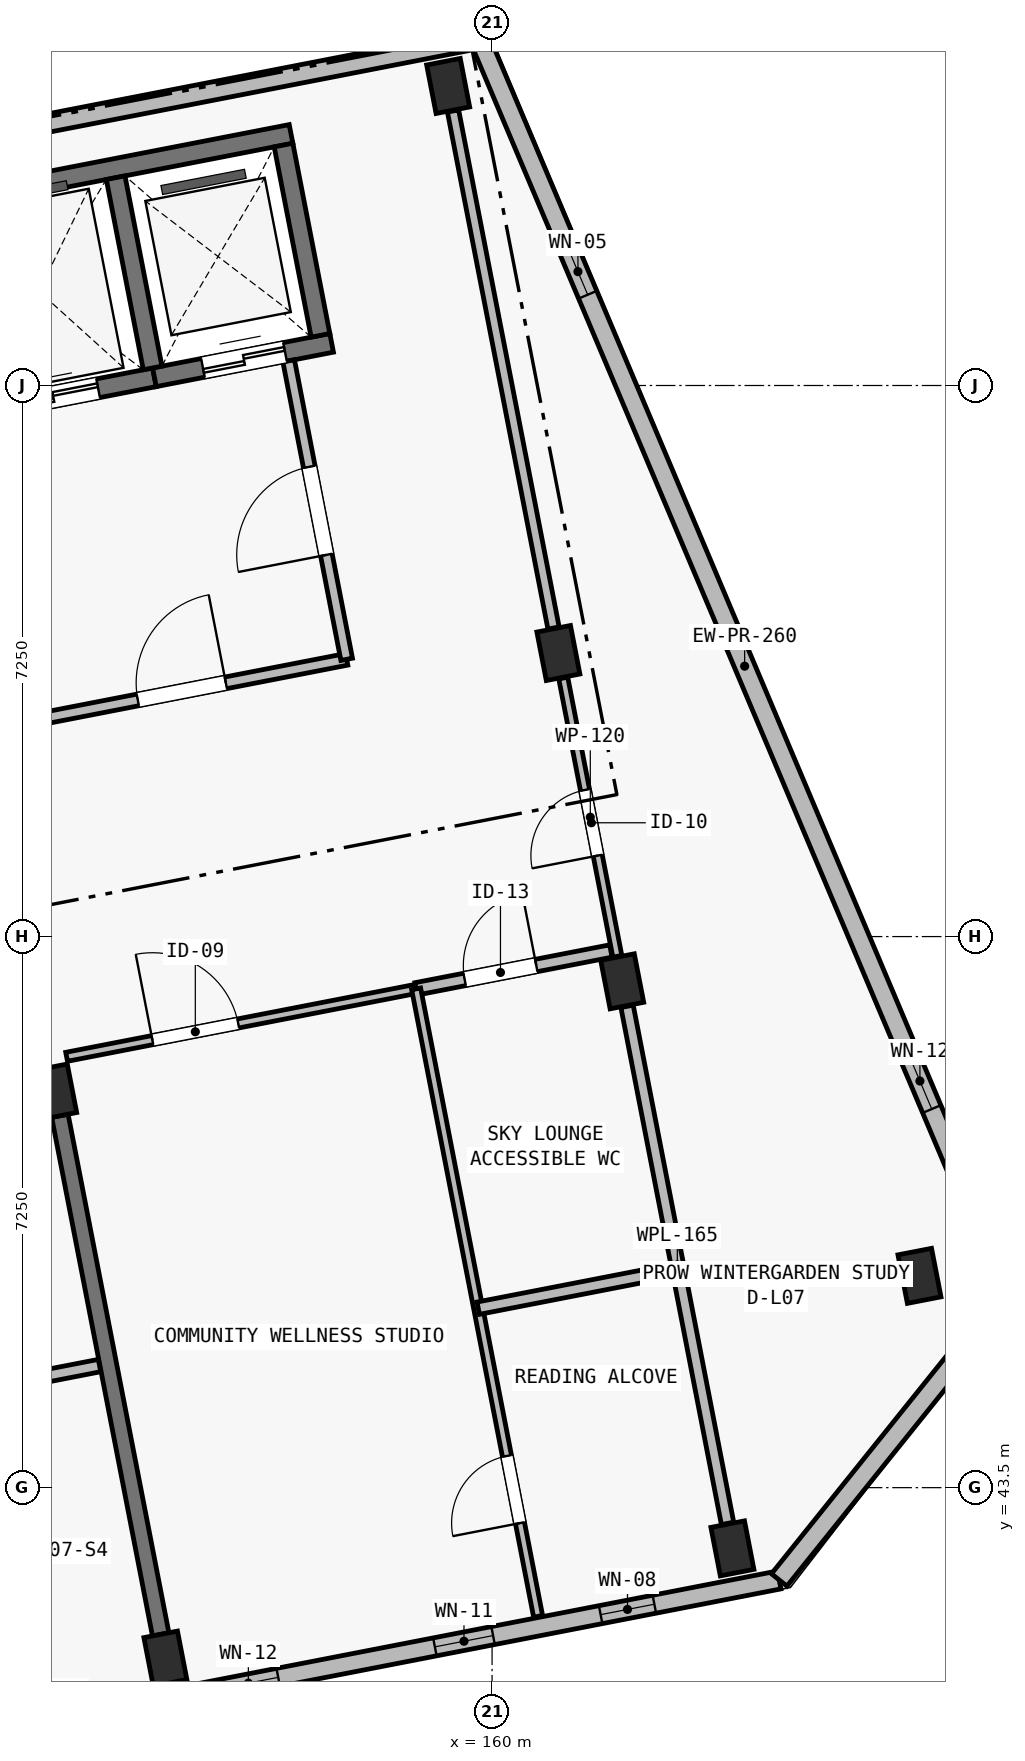
"""IFC4 building model, lengths in metres.
Left out: names, types, materials, properties, quantities, classifications, styles, units other than length and angle.
Written with IfcOpenShell. Run it as: python <this file> out.ifc"""

import sys

from ifc_helpers import new_model, si_unit, direction, frame, frame_2d, origin, origin_2d, place, context, subcontext, project, spatial, rectangle, extrude, element, fill, save


model = new_model("IFC4")
c1 = context("Model", 3, precision=1e-05, world=origin(), true_north=direction((0.0, 1.0)))
c2 = subcontext(c1, "Body", "Model", "MODEL_VIEW")
j1 = project(units=[si_unit("LENGTHUNIT", "METRE"), si_unit("PLANEANGLEUNIT", "RADIAN")], contexts=[c1])
p1 = place(None, origin())
s1 = spatial("IfcSite", under=j1, at=p1, CompositionType="ELEMENT")
p2 = place(p1, origin())
s2 = spatial("IfcBuilding", under=s1, at=p2, CompositionType="ELEMENT")
p3 = place(p2, frame((0.0, 0.0, 24.65)))
s3 = spatial("IfcBuildingStorey", under=s2, at=p3, CompositionType="ELEMENT", Elevation=24.65)
for number, where, z_axis, x_axis in (
    (1, (155.702, 41.251, 0.0), (0.0, 0.0, 1.0), (0.982, 0.191, 0.0)),
    (2, (154.252, 48.711, 0.0), (0.0, 0.0, 1.0), (0.982, 0.191, 0.0)),
    (3, (163.162, 42.701, 0.0), (0.0, 0.0, 1.0), (0.982, 0.191, 0.0)),
    (4, (161.712, 50.161, 0.0), (0.0, 0.0, 1.0), (0.982, 0.191, 0.0)),
    (5, (160.873, 54.48, 0.0), (0.0, 0.0, 1.0), (0.982, 0.191, 0.0)),
    (6, (159.422, 61.941, 0.0), (0.0, 0.0, 1.0), (0.982, 0.191, 0.0)),
    (7, (165.623, 46.286, 0.0), (0.0, 0.0, 1.0), (0.982, 0.191, 0.0)),
):
    element("IfcColumn", number, at=place(p3, frame(where, z_axis=z_axis, x_axis=x_axis)), inside=s3, PredefinedType="COLUMN", context=c2, shape_type="SweptSolid", body=[
        extrude(rectangle(XDim=0.45, YDim=0.65, at=origin_2d()), origin(), (0.0, 0.0, 1.0), 3.25),
    ])
p4 = place(p3, frame((155.64, 41.57, 0.0), z_axis=(0.0, 0.0, 1.0), x_axis=(-0.190817005532, 0.981625626397, 0.0)))
e8 = element("IfcWall", 8, at=p4, inside=s3, PredefinedType="SHEAR", context=c2, shape_type="SweptSolid", body=[
    extrude(rectangle(XDim=6.95, YDim=0.22, at=frame_2d((3.475, 0.0))), origin(), (0.0, 0.0, 1.0), 2.5),
])
p5 = place(p3, frame((152.397, 60.346, 0.0), z_axis=(0.0, 0.0, 1.0), x_axis=(0.981635261308, 0.190767433692, 0.0)))
e9 = element("IfcWall", 9, at=p5, inside=s3, PredefinedType="SHEAR", context=c2, shape_type="SweptSolid", body=[
    extrude(rectangle(XDim=5.05, YDim=0.25, at=frame_2d((2.525, 0.0))), origin(), (0.0, 0.0, 1.0), 3.25),
])
p6 = place(p3, frame((152.932, 57.598, 0.0), z_axis=(0.0, 0.0, 1.0), x_axis=(0.981636759622, 0.190759723627, 0.0)))
e10 = element("IfcWall", 10, at=p6, inside=s3, PredefinedType="SHEAR", context=c2, shape_type="SweptSolid", body=[
    extrude(rectangle(XDim=2.675, YDim=0.25, at=frame_2d((1.337, 0.0))), origin(), (0.0, 0.0, 1.0), 3.25),
])
p7 = place(p6, frame((0.72, 0.0, 0.0)))
e11 = element("IfcOpeningElement", 11, at=p7, cuts=e10, PredefinedType="OPENING", context=c2, shape_type="SweptSolid", body=[
    extrude(rectangle(XDim=1.2, YDim=2.2, at=frame_2d((0.6, 1.1))), frame((0.0, 0.14, 0.0), z_axis=(0.0, -1.0, 0.0), x_axis=(1.0, 0.0, 0.0)), (0.0, 0.0, 1.0), 0.28),
])
p8 = place(p3, frame((155.558, 58.108, 0.0), z_axis=(0.0, 0.0, 1.0), x_axis=(0.981633573872, 0.190776116556, 0.0)))
e12 = element("IfcWall", 12, at=p8, inside=s3, PredefinedType="SHEAR", context=c2, shape_type="SweptSolid", body=[
    extrude(rectangle(XDim=2.375, YDim=0.25, at=frame_2d((1.188, 0.0))), origin(), (0.0, 0.0, 1.0), 3.25),
])
p9 = place(p8, frame((0.65, 0.0, 0.0)))
e13 = element("IfcOpeningElement", 13, at=p9, cuts=e12, PredefinedType="OPENING", context=c2, shape_type="SweptSolid", body=[
    extrude(rectangle(XDim=1.1, YDim=2.15, at=frame_2d((0.55, 1.075))), frame((0.0, 0.14, 0.0), z_axis=(0.0, -1.0, 0.0), x_axis=(1.0, 0.0, 0.0)), (0.0, 0.0, 1.0), 0.28),
])
for number, where, z_axis, x_axis in (
    (14, (155.534, 58.231, 0.0), (0.0, 0.0, 1.0), (-0.191, 0.982, 0.0)),
    (15, (157.742, 58.66, 0.0), (0.0, 0.0, 1.0), (-0.191, 0.982, 0.0)),
):
    element("IfcWall", number, at=place(p3, frame(where, z_axis=z_axis, x_axis=x_axis)), inside=s3, PredefinedType="SHEAR", context=c2, shape_type="SweptSolid", body=[
        extrude(rectangle(XDim=2.55, YDim=0.25, at=frame_2d((1.275, 0.0))), origin(), (0.0, 0.0, 1.0), 3.25),
    ])
p10 = place(p3, frame((163.778, 42.286, 0.0), z_axis=(0.0, 0.0, 1.0), x_axis=(-0.981628367112, -0.190802905848, 0.0)))
e16 = element("IfcWall", 16, at=p10, inside=s3, PredefinedType="SOLIDWALL", context=c2, shape_type="SweptSolid", body=[
    extrude(rectangle(XDim=8.125, YDim=0.24, at=frame_2d((4.062, 0.0))), origin(), (0.0, 0.0, 1.0), 3.0),
])
p11 = place(p10, frame((1.673, 0.0, 0.42)))
e17 = element("IfcOpeningElement", 17, at=p11, cuts=e16, PredefinedType="OPENING", context=c2, shape_type="SweptSolid", body=[
    extrude(rectangle(XDim=0.72, YDim=2.16, at=frame_2d((0.36, 1.08))), frame((0.0, 0.135, 0.0), z_axis=(0.0, -1.0, 0.0), x_axis=(1.0, 0.0, 0.0)), (0.0, 0.0, 1.0), 0.27),
])
p12 = place(p10, frame((3.835, 0.0, 0.42)))
e18 = element("IfcOpeningElement", 18, at=p12, cuts=e16, PredefinedType="OPENING", context=c2, shape_type="SweptSolid", body=[
    extrude(rectangle(XDim=0.78, YDim=2.2, at=frame_2d((0.39, 1.1))), frame((0.0, 0.135, 0.0), z_axis=(0.0, -1.0, 0.0), x_axis=(1.0, 0.0, 0.0)), (0.0, 0.0, 1.0), 0.27),
])
p13 = place(p10, frame((6.715, 0.0, 0.48)))
e19 = element("IfcOpeningElement", 19, at=p13, cuts=e16, PredefinedType="OPENING", context=c2, shape_type="SweptSolid", body=[
    extrude(rectangle(XDim=0.8, YDim=2.3, at=frame_2d((0.4, 1.15))), frame((0.0, 0.135, 0.0), z_axis=(0.0, -1.0, 0.0), x_axis=(1.0, 0.0, 0.0)), (0.0, 0.0, 1.0), 0.27),
])
p14 = place(p3, frame((151.862, 61.006, 0.0), z_axis=(0.0, 0.0, 1.0), x_axis=(0.981627273155, 0.190808533872, 0.0)))
e20 = element("IfcWall", 20, at=p14, inside=s3, PredefinedType="SOLIDWALL", context=c2, shape_type="SweptSolid", body=[
    extrude(rectangle(XDim=8.125, YDim=0.24, at=frame_2d((4.062, 0.0))), origin(), (0.0, 0.0, 1.0), 3.0),
])
p15 = place(p3, frame((159.837, 62.556, 0.0), z_axis=(0.0, 0.0, 1.0), x_axis=(0.389225507936, -0.921142499276, 0.0)))
e21 = element("IfcWall", 21, at=p15, inside=s3, PredefinedType="SOLIDWALL", context=c2, shape_type="SweptSolid", body=[
    extrude(rectangle(XDim=17.91, YDim=0.26, at=frame_2d((8.955, 0.0))), origin(), (0.0, 0.0, 1.0), 3.0),
])
p16 = place(p15, frame((2.99, 0.0, 0.52)))
e22 = element("IfcOpeningElement", 22, at=p16, cuts=e21, PredefinedType="OPENING", context=c2, shape_type="SweptSolid", body=[
    extrude(rectangle(XDim=0.66, YDim=2.32, at=frame_2d((0.33, 1.16))), frame((0.0, 0.145, 0.0), z_axis=(0.0, -1.0, 0.0), x_axis=(1.0, 0.0, 0.0)), (0.0, 0.0, 1.0), 0.29),
])
p17 = place(p15, frame((14.48, 0.0, 0.45)))
e23 = element("IfcOpeningElement", 23, at=p17, cuts=e21, PredefinedType="OPENING", context=c2, shape_type="SweptSolid", body=[
    extrude(rectangle(XDim=0.8, YDim=2.3, at=frame_2d((0.4, 1.15))), frame((0.0, 0.145, 0.0), z_axis=(0.0, -1.0, 0.0), x_axis=(1.0, 0.0, 0.0)), (0.0, 0.0, 1.0), 0.29),
])
p18 = place(p3, frame((166.809, 46.058, 0.0), z_axis=(0.0, 0.0, 1.0), x_axis=(-0.626281072923, -0.779597343312, 0.0)))
e24 = element("IfcWall", 24, at=p18, inside=s3, PredefinedType="SOLIDWALL", context=c2, shape_type="SweptSolid", body=[
    extrude(rectangle(XDim=4.839, YDim=0.26, at=frame_2d((2.42, 0.0))), origin(), (0.0, 0.0, 1.0), 3.0),
])
p19 = place(p3, frame((153.768, 53.558, 0.0), z_axis=(0.0, 0.0, 1.0), x_axis=(0.981624918225, 0.190820648566, 0.0)))
e25 = element("IfcWall", 25, at=p19, inside=s3, PredefinedType="PARTITIONING", context=c2, shape_type="SweptSolid", body=[
    extrude(rectangle(XDim=4.4, YDim=0.155, at=frame_2d((2.2, 0.0))), origin(), (0.0, 0.0, 1.0), 2.97),
])
p20 = place(p19, frame((1.6, 0.0, 0.0)))
e26 = element("IfcOpeningElement", 26, at=p20, cuts=e25, PredefinedType="OPENING", context=c2, shape_type="SweptSolid", body=[
    extrude(rectangle(XDim=1.18, YDim=2.15, at=frame_2d((0.59, 1.075))), frame((0.0, 0.093, 0.0), z_axis=(0.0, -1.0, 0.0), x_axis=(1.0, 0.0, 0.0)), (0.0, 0.0, 1.0), 0.185),
])
p21 = place(p3, frame((158.087, 54.397, 0.0), z_axis=(0.0, 0.0, 1.0), x_axis=(-0.190796144009, 0.981629681413, 0.0)))
e27 = element("IfcWall", 27, at=p21, inside=s3, PredefinedType="PARTITIONING", context=c2, shape_type="SweptSolid", body=[
    extrude(rectangle(XDim=4.0, YDim=0.155, at=frame_2d((2.0, 0.0))), origin(), (0.0, 0.0, 1.0), 2.97),
])
p22 = place(p21, frame((1.4, 0.0, 0.0)))
e28 = element("IfcOpeningElement", 28, at=p22, cuts=e27, PredefinedType="OPENING", context=c2, shape_type="SweptSolid", body=[
    extrude(rectangle(XDim=1.18, YDim=2.15, at=frame_2d((0.59, 1.075))), frame((0.0, 0.093, 0.0), z_axis=(0.0, -1.0, 0.0), x_axis=(1.0, 0.0, 0.0)), (0.0, 0.0, 1.0), 0.185),
])
p23 = place(p3, frame((161.648, 50.49, 0.0), z_axis=(0.0, 0.0, 1.0), x_axis=(-0.190789073686, 0.981631055622, 0.0)))
e29 = element("IfcWall", 29, at=p23, inside=s3, PredefinedType="PARTITIONING", context=c2, shape_type="SweptSolid", body=[
    extrude(rectangle(XDim=3.73, YDim=0.12, at=frame_2d((1.865, 0.0))), origin(), (0.0, 0.0, 1.0), 2.5),
])
p24 = place(p23, frame((1.35, 0.0, 0.0)))
e30 = element("IfcOpeningElement", 30, at=p24, cuts=e29, PredefinedType="OPENING", context=c2, shape_type="SweptSolid", body=[
    extrude(rectangle(XDim=0.88, YDim=2.1, at=frame_2d((0.44, 1.05))), frame((0.0, 0.075, 0.0), z_axis=(0.0, -1.0, 0.0), x_axis=(1.0, 0.0, 0.0)), (0.0, 0.0, 1.0), 0.15),
])
p25 = place(p3, frame((160.809, 54.809, 0.0), z_axis=(0.0, 0.0, 1.0), x_axis=(-0.190808365525, 0.981627305878, 0.0)))
e31 = element("IfcWall", 31, at=p25, inside=s3, PredefinedType="PARTITIONING", context=c2, shape_type="SweptSolid", body=[
    extrude(rectangle(XDim=6.93, YDim=0.15, at=frame_2d((3.465, 0.0))), origin(), (0.0, 0.0, 1.0), 2.5),
])
p26 = place(p3, frame((163.098, 43.03, 0.0), z_axis=(0.0, 0.0, 1.0), x_axis=(-0.190835713385, 0.981621989616, 0.0)))
e32 = element("IfcWall", 32, at=p26, inside=s3, PredefinedType="PLUMBINGWALL", context=c2, shape_type="SweptSolid", body=[
    extrude(rectangle(XDim=6.93, YDim=0.165, at=frame_2d((3.465, 0.0))), origin(), (0.0, 0.0, 1.0), 2.5),
])
p27 = place(p3, frame((151.218, 44.403, 0.0), z_axis=(0.0, 0.0, 1.0), x_axis=(0.981626422232, 0.190812911449, 0.0)))
e33 = element("IfcWall", 33, at=p27, inside=s3, PredefinedType="PLUMBINGWALL", context=c2, shape_type="SweptSolid", body=[
    extrude(rectangle(XDim=3.685, YDim=0.165, at=frame_2d((1.842, 0.0))), origin(), (0.0, 0.0, 1.0), 2.97),
])
p28 = place(p27, frame((1.3, 0.0, 0.0)))
e34 = element("IfcOpeningElement", 34, at=p28, cuts=e33, PredefinedType="OPENING", context=c2, shape_type="SweptSolid", body=[
    extrude(rectangle(XDim=0.82, YDim=2.08, at=frame_2d((0.41, 1.04))), frame((0.0, 0.097, 0.0), z_axis=(0.0, -1.0, 0.0), x_axis=(1.0, 0.0, 0.0)), (0.0, 0.0, 1.0), 0.195),
])
p29 = place(p3, frame((154.402, 49.168, 0.0), z_axis=(0.0, 0.0, 1.0), x_axis=(0.981622711665, 0.190831999263, 0.0)))
e35 = element("IfcWall", 35, at=p29, inside=s3, PredefinedType="PARTITIONING", context=c2, shape_type="SweptSolid", body=[
    extrude(rectangle(XDim=4.685, YDim=0.12, at=frame_2d((2.343, 0.0))), origin(), (0.0, 0.0, 1.0), 2.97),
])
p30 = place(p29, frame((1.15, 0.0, 0.0)))
e36 = element("IfcOpeningElement", 36, at=p30, cuts=e35, PredefinedType="OPENING", context=c2, shape_type="SweptSolid", body=[
    extrude(rectangle(XDim=1.15, YDim=2.15, at=frame_2d((0.575, 1.075))), frame((0.0, 0.075, 0.0), z_axis=(0.0, -1.0, 0.0), x_axis=(1.0, 0.0, 0.0)), (0.0, 0.0, 1.0), 0.15),
])
p31 = place(p3, frame((159.001, 50.062, 0.0), z_axis=(0.0, 0.0, 1.0), x_axis=(0.981624151626, 0.190824592083, 0.0)))
e37 = element("IfcWall", 37, at=p31, inside=s3, PredefinedType="PLUMBINGWALL", context=c2, shape_type="SweptSolid", body=[
    extrude(rectangle(XDim=2.61, YDim=0.165, at=frame_2d((1.305, 0.0))), origin(), (0.0, 0.0, 1.0), 2.97),
])
p32 = place(p31, frame((0.65, 0.0, 0.0)))
e38 = element("IfcOpeningElement", 38, at=p32, cuts=e37, PredefinedType="OPENING", context=c2, shape_type="SweptSolid", body=[
    extrude(rectangle(XDim=0.96, YDim=2.12, at=frame_2d((0.48, 1.06))), frame((0.0, 0.097, 0.0), z_axis=(0.0, -1.0, 0.0), x_axis=(1.0, 0.0, 0.0)), (0.0, 0.0, 1.0), 0.195),
])
p33 = place(p3, frame((160.606, 41.807, 0.0), z_axis=(0.0, 0.0, 1.0), x_axis=(-0.190809830256, 0.981627021163, 0.0)))
e39 = element("IfcWall", 39, at=p33, inside=s3, PredefinedType="PARTITIONING", context=c2, shape_type="SweptSolid", body=[
    extrude(rectangle(XDim=8.41, YDim=0.12, at=frame_2d((4.205, 0.0))), origin(), (0.0, 0.0, 1.0), 2.97),
])
p34 = place(p33, frame((1.25, 0.0, 0.0)))
e40 = element("IfcOpeningElement", 40, at=p34, cuts=e39, PredefinedType="OPENING", context=c2, shape_type="SweptSolid", body=[
    extrude(rectangle(XDim=0.9, YDim=2.1, at=frame_2d((0.45, 1.05))), frame((0.0, 0.075, 0.0), z_axis=(0.0, -1.0, 0.0), x_axis=(1.0, 0.0, 0.0)), (0.0, 0.0, 1.0), 0.15),
])
p35 = place(p3, frame((159.818, 45.861, 0.0), z_axis=(0.0, 0.0, 1.0), x_axis=(0.981628634101, 0.19080153226, 0.0)))
e41 = element("IfcWall", 41, at=p35, inside=s3, PredefinedType="PLUMBINGWALL", context=c2, shape_type="SweptSolid", body=[
    extrude(rectangle(XDim=2.59, YDim=0.165, at=frame_2d((1.295, 0.0))), origin(), (0.0, 0.0, 1.0), 2.97),
])
p36 = place(p11, origin())
e42 = element("IfcWindow", 42, at=p36, inside=s3, PartitioningType="SINGLE_PANEL", PredefinedType="WINDOW", context=c2, shape_type="SweptSolid", body=[
    extrude(rectangle(XDim=0.72, YDim=2.16, at=frame_2d((0.36, 1.08))), frame((0.0, 0.03, 0.0), z_axis=(0.0, -1.0, 0.0), x_axis=(1.0, 0.0, 0.0)), (0.0, 0.0, 1.0), 0.06),
])
fill(e17, e42)
p37 = place(p12, origin())
e43 = element("IfcWindow", 43, at=p37, inside=s3, PartitioningType="SINGLE_PANEL", PredefinedType="WINDOW", context=c2, shape_type="SweptSolid", body=[
    extrude(rectangle(XDim=0.78, YDim=2.2, at=frame_2d((0.39, 1.1))), frame((0.0, 0.03, 0.0), z_axis=(0.0, -1.0, 0.0), x_axis=(1.0, 0.0, 0.0)), (0.0, 0.0, 1.0), 0.06),
])
fill(e18, e43)
p38 = place(p13, origin())
e44 = element("IfcWindow", 44, at=p38, inside=s3, PartitioningType="SINGLE_PANEL", PredefinedType="WINDOW", context=c2, shape_type="SweptSolid", body=[
    extrude(rectangle(XDim=0.8, YDim=2.3, at=frame_2d((0.4, 1.15))), frame((0.0, 0.03, 0.0), z_axis=(0.0, -1.0, 0.0), x_axis=(1.0, 0.0, 0.0)), (0.0, 0.0, 1.0), 0.06),
])
fill(e19, e44)
p39 = place(p16, origin())
e45 = element("IfcWindow", 45, at=p39, inside=s3, PartitioningType="SINGLE_PANEL", PredefinedType="WINDOW", context=c2, shape_type="SweptSolid", body=[
    extrude(rectangle(XDim=0.66, YDim=2.32, at=frame_2d((0.33, 1.16))), frame((0.0, 0.03, 0.0), z_axis=(0.0, -1.0, 0.0), x_axis=(1.0, 0.0, 0.0)), (0.0, 0.0, 1.0), 0.06),
])
fill(e22, e45)
p40 = place(p17, origin())
e46 = element("IfcWindow", 46, at=p40, inside=s3, PartitioningType="SINGLE_PANEL", PredefinedType="WINDOW", context=c2, shape_type="SweptSolid", body=[
    extrude(rectangle(XDim=0.8, YDim=2.3, at=frame_2d((0.4, 1.15))), frame((0.0, 0.03, 0.0), z_axis=(0.0, -1.0, 0.0), x_axis=(1.0, 0.0, 0.0)), (0.0, 0.0, 1.0), 0.06),
])
fill(e23, e46)
p41 = place(p20, origin())
e47 = element("IfcDoor", 47, at=p41, inside=s3, OperationType="SINGLE_SWING_RIGHT", PredefinedType="DOOR", context=c2, shape_type="SweptSolid", body=[
    extrude(rectangle(XDim=1.18, YDim=2.15, at=frame_2d((0.59, 1.075))), frame((0.0, 0.025, 0.0), z_axis=(0.0, -1.0, 0.0), x_axis=(1.0, 0.0, 0.0)), (0.0, 0.0, 1.0), 0.05),
])
fill(e26, e47)
p42 = place(p22, origin())
e48 = element("IfcDoor", 48, at=p42, inside=s3, OperationType="SINGLE_SWING_LEFT", PredefinedType="DOOR", context=c2, shape_type="SweptSolid", body=[
    extrude(rectangle(XDim=1.18, YDim=2.15, at=frame_2d((0.59, 1.075))), frame((0.0, 0.025, 0.0), z_axis=(0.0, -1.0, 0.0), x_axis=(1.0, 0.0, 0.0)), (0.0, 0.0, 1.0), 0.05),
])
fill(e28, e48)
p43 = place(p24, origin())
e49 = element("IfcDoor", 49, at=p43, inside=s3, OperationType="SINGLE_SWING_LEFT", PredefinedType="DOOR", context=c2, shape_type="SweptSolid", body=[
    extrude(rectangle(XDim=0.88, YDim=2.1, at=frame_2d((0.44, 1.05))), frame((0.0, 0.025, 0.0), z_axis=(0.0, -1.0, 0.0), x_axis=(1.0, 0.0, 0.0)), (0.0, 0.0, 1.0), 0.05),
])
fill(e30, e49)
p44 = place(p30, origin())
e50 = element("IfcDoor", 50, at=p44, inside=s3, OperationType="SINGLE_SWING_LEFT", PredefinedType="DOOR", context=c2, shape_type="SweptSolid", body=[
    extrude(rectangle(XDim=1.15, YDim=2.15, at=frame_2d((0.575, 1.075))), frame((0.0, 0.025, 0.0), z_axis=(0.0, -1.0, 0.0), x_axis=(1.0, 0.0, 0.0)), (0.0, 0.0, 1.0), 0.05),
])
fill(e36, e50)
p45 = place(p32, origin())
e51 = element("IfcDoor", 51, at=p45, inside=s3, OperationType="SINGLE_SWING_RIGHT", PredefinedType="DOOR", context=c2, shape_type="SweptSolid", body=[
    extrude(rectangle(XDim=0.96, YDim=2.12, at=frame_2d((0.48, 1.06))), frame((0.0, 0.025, 0.0), z_axis=(0.0, -1.0, 0.0), x_axis=(1.0, 0.0, 0.0)), (0.0, 0.0, 1.0), 0.05),
])
fill(e38, e51)
p46 = place(p34, origin())
e52 = element("IfcDoor", 52, at=p46, inside=s3, OperationType="SINGLE_SWING_LEFT", PredefinedType="DOOR", context=c2, shape_type="SweptSolid", body=[
    extrude(rectangle(XDim=0.9, YDim=2.1, at=frame_2d((0.45, 1.05))), frame((0.0, 0.025, 0.0), z_axis=(0.0, -1.0, 0.0), x_axis=(1.0, 0.0, 0.0)), (0.0, 0.0, 1.0), 0.05),
])
fill(e40, e52)
p47 = place(p7, origin())
e53 = element("IfcDoor", 53, at=p47, inside=s3, OperationType="DOUBLE_DOOR_SLIDING", PredefinedType="DOOR", context=c2, shape_type="SweptSolid", body=[
    extrude(rectangle(XDim=1.2, YDim=2.2, at=frame_2d((0.6, 1.1))), frame((0.0, 0.025, 0.0), z_axis=(0.0, -1.0, 0.0), x_axis=(1.0, 0.0, 0.0)), (0.0, 0.0, 1.0), 0.05),
])
fill(e11, e53)
p48 = place(p9, origin())
e54 = element("IfcDoor", 54, at=p48, inside=s3, OperationType="DOUBLE_DOOR_SLIDING", PredefinedType="DOOR", context=c2, shape_type="SweptSolid", body=[
    extrude(rectangle(XDim=1.1, YDim=2.15, at=frame_2d((0.55, 1.075))), frame((0.0, 0.025, 0.0), z_axis=(0.0, -1.0, 0.0), x_axis=(1.0, 0.0, 0.0)), (0.0, 0.0, 1.0), 0.05),
])
fill(e13, e54)
save(model, sys.argv[1])
